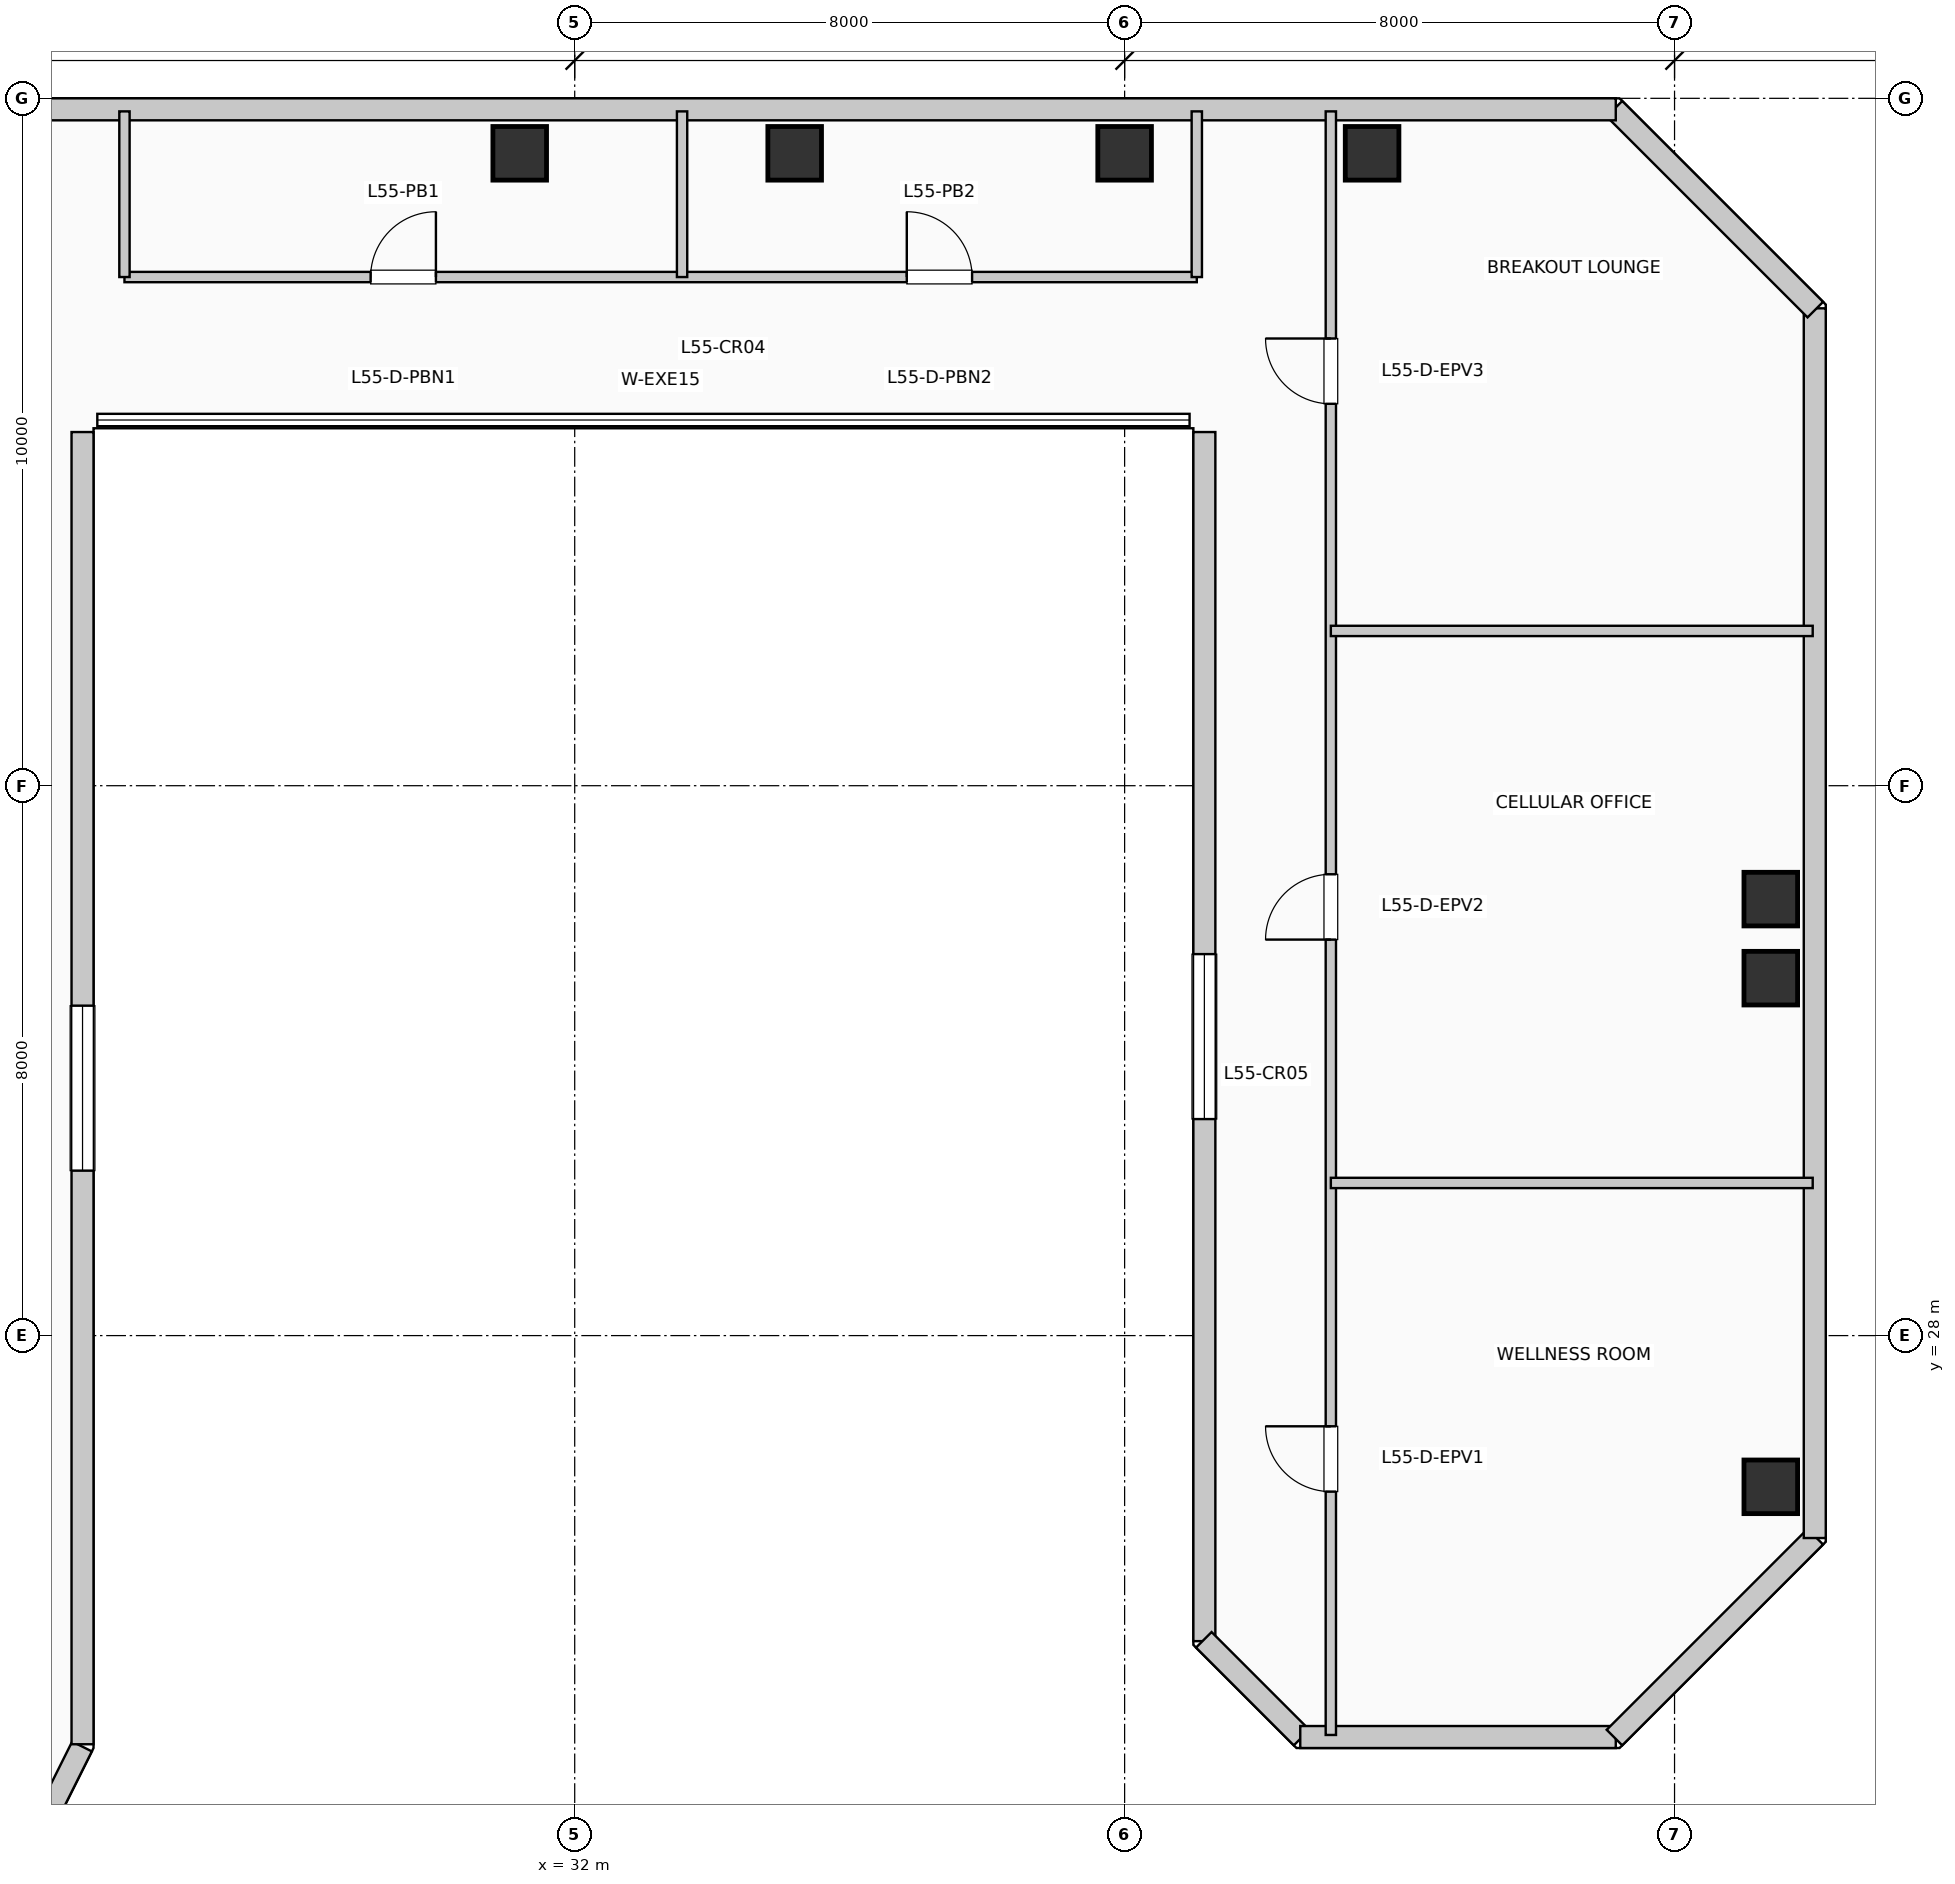
"""IFC4 building model, lengths in metres.
Left out: names, types, materials, properties, quantities, classifications, styles, units other than length and angle.
Written with IfcOpenShell. Run it as: python <this file> out.ifc"""

import sys

from ifc_helpers import new_model, si_unit, direction, frame, frame_2d, origin, origin_2d, place, context, subcontext, project, spatial, rectangle, extrude, element, fill, save


model = new_model("IFC4")
c1 = context("Model", 3, precision=1e-05, world=origin(), true_north=direction((0.0, 1.0)))
c2 = subcontext(c1, "Body", "Model", "MODEL_VIEW")
j1 = project(units=[si_unit("LENGTHUNIT", "METRE"), si_unit("PLANEANGLEUNIT", "RADIAN")], contexts=[c1])
p1 = place(None, origin())
s1 = spatial("IfcSite", under=j1, at=p1, CompositionType="ELEMENT")
p2 = place(p1, origin())
s2 = spatial("IfcBuilding", under=s1, at=p2, CompositionType="ELEMENT")
p3 = place(p2, frame((0.0, 0.0, 227.7)))
s3 = spatial("IfcBuildingStorey", under=s2, at=p3, CompositionType="ELEMENT", Elevation=227.7)
for number, where, z_axis, x_axis in (
    (1, (31.2, 45.2, 0.0), (0.0, 0.0, 1.0), (1.0, 0.0, 0.0)),
    (2, (35.2, 45.2, 0.0), (0.0, 0.0, 1.0), (1.0, 0.0, 0.0)),
    (3, (40.0, 45.2, 0.0), (0.0, 0.0, 1.0), (1.0, 0.0, 0.0)),
    (4, (43.6, 45.2, 0.0), (0.0, 0.0, 1.0), (1.0, 0.0, 0.0)),
    (5, (49.4, 25.8, 0.0), (0.0, 0.0, 1.0), (1.0, 0.0, 0.0)),
    (6, (49.4, 33.2, 0.0), (0.0, 0.0, 1.0), (1.0, 0.0, 0.0)),
    (7, (49.4, 34.35, 0.0), (0.0, 0.0, 1.0), (1.0, 0.0, 0.0)),
):
    element("IfcColumn", number, at=place(p3, frame(where, z_axis=z_axis, x_axis=x_axis)), inside=s3, PredefinedType="COLUMN", context=c2, shape_type="SweptSolid", body=[
        extrude(rectangle(XDim=0.78, YDim=0.78, at=origin_2d()), origin(), (0.0, 0.0, 1.0), 3.96),
    ])
p4 = place(p3, frame((23.882, 20.121, 0.0), z_axis=(0.0, 0.0, 1.0), x_axis=(0.447121734542, 0.894473115583, 0.0)))
e8 = element("IfcWall", 8, at=p4, inside=s3, PredefinedType="SOLIDWALL", context=c2, shape_type="SweptSolid", body=[
    extrude(rectangle(XDim=2.126, YDim=0.32, at=frame_2d((1.063, 0.0))), origin(), (0.0, 0.0, 1.0), 3.71),
])
p5 = place(p3, frame((24.84, 22.055, 0.0), z_axis=(0.0, 0.0, 1.0), x_axis=(0.0, 1.0, 0.0)))
e9 = element("IfcWall", 9, at=p5, inside=s3, PredefinedType="SOLIDWALL", context=c2, shape_type="SweptSolid", body=[
    extrude(rectangle(XDim=19.09, YDim=0.32, at=frame_2d((9.545, 0.0))), origin(), (0.0, 0.0, 1.0), 3.71),
])
p6 = place(p5, frame((8.345, 0.0, 0.85)))
e10 = element("IfcOpeningElement", 10, at=p6, cuts=e9, PredefinedType="OPENING", context=c2, shape_type="SweptSolid", body=[
    extrude(rectangle(XDim=2.4, YDim=2.05, at=frame_2d((1.2, 1.025))), frame((0.0, 0.17, 0.0), z_axis=(0.0, -1.0, 0.0), x_axis=(1.0, 0.0, 0.0)), (0.0, 0.0, 1.0), 0.34),
])
p7 = place(p3, frame((41.16, 41.145, 0.0), z_axis=(0.0, 0.0, 1.0), x_axis=(0.0, -1.0, 0.0)))
e11 = element("IfcWall", 11, at=p7, inside=s3, PredefinedType="SOLIDWALL", context=c2, shape_type="SweptSolid", body=[
    extrude(rectangle(XDim=17.59, YDim=0.32, at=frame_2d((8.795, 0.0))), origin(), (0.0, 0.0, 1.0), 3.71),
])
p8 = place(p7, frame((7.595, 0.0, 0.85)))
e12 = element("IfcOpeningElement", 12, at=p8, cuts=e11, PredefinedType="OPENING", context=c2, shape_type="SweptSolid", body=[
    extrude(rectangle(XDim=2.4, YDim=2.05, at=frame_2d((1.2, 1.025))), frame((0.0, 0.17, 0.0), z_axis=(0.0, -1.0, 0.0), x_axis=(1.0, 0.0, 0.0)), (0.0, 0.0, 1.0), 0.34),
])
p9 = place(p3, frame((41.152, 23.574, 0.0), z_axis=(0.0, 0.0, 1.0), x_axis=(0.707106781187, -0.707106781187, 0.0)))
e13 = element("IfcWall", 13, at=p9, inside=s3, PredefinedType="SOLIDWALL", context=c2, shape_type="SweptSolid", body=[
    extrude(rectangle(XDim=2.011, YDim=0.32, at=frame_2d((1.006, 0.0))), origin(), (0.0, 0.0, 1.0), 3.71),
])
p10 = place(p3, frame((42.555, 22.16, 0.0), z_axis=(0.0, 0.0, 1.0), x_axis=(1.0, 0.0, 0.0)))
e14 = element("IfcWall", 14, at=p10, inside=s3, PredefinedType="SOLIDWALL", context=c2, shape_type="SweptSolid", body=[
    extrude(rectangle(XDim=4.59, YDim=0.32, at=frame_2d((2.295, 0.0))), origin(), (0.0, 0.0, 1.0), 3.71),
])
p11 = place(p3, frame((47.126, 22.152, 0.0), z_axis=(0.0, 0.0, 1.0), x_axis=(0.707136318428, 0.707077242712, 0.0)))
e15 = element("IfcWall", 15, at=p11, inside=s3, PredefinedType="SOLIDWALL", context=c2, shape_type="SweptSolid", body=[
    extrude(rectangle(XDim=4.133, YDim=0.32, at=frame_2d((2.066, 0.0))), origin(), (0.0, 0.0, 1.0), 3.71),
])
p12 = place(p3, frame((50.04, 25.055, 0.0), z_axis=(0.0, 0.0, 1.0), x_axis=(0.0, 1.0, 0.0)))
e16 = element("IfcWall", 16, at=p12, inside=s3, PredefinedType="SOLIDWALL", context=c2, shape_type="SweptSolid", body=[
    extrude(rectangle(XDim=17.89, YDim=0.32, at=frame_2d((8.945, 0.0))), origin(), (0.0, 0.0, 1.0), 3.71),
])
p13 = place(p3, frame((50.048, 42.926, 0.0), z_axis=(0.0, 0.0, 1.0), x_axis=(-0.707136318428, 0.707077242712, 0.0)))
e17 = element("IfcWall", 17, at=p13, inside=s3, PredefinedType="SOLIDWALL", context=c2, shape_type="SweptSolid", body=[
    extrude(rectangle(XDim=4.133, YDim=0.32, at=frame_2d((2.066, 0.0))), origin(), (0.0, 0.0, 1.0), 3.71),
])
p14 = place(p3, frame((47.145, 45.84, 0.0), z_axis=(0.0, 0.0, 1.0), x_axis=(-1.0, 0.0, 0.0)))
e18 = element("IfcWall", 18, at=p14, inside=s3, PredefinedType="SOLIDWALL", context=c2, shape_type="SweptSolid", body=[
    extrude(rectangle(XDim=23.74, YDim=0.32, at=frame_2d((11.87, 0.0))), origin(), (0.0, 0.0, 1.0), 3.71),
])
p15 = place(p3, frame((25.45, 43.4, 0.0), z_axis=(0.0, 0.0, 1.0), x_axis=(1.0, 0.0, 0.0)))
e19 = element("IfcWall", 19, at=p15, inside=s3, PredefinedType="PARTITIONING", context=c2, shape_type="SweptSolid", body=[
    extrude(rectangle(XDim=15.6, YDim=0.15, at=frame_2d((7.8, 0.0))), origin(), (0.0, 0.0, 1.0), 3.71),
])
p16 = place(p15, frame((3.581, 0.0, 0.0)))
e20 = element("IfcOpeningElement", 20, at=p16, cuts=e19, PredefinedType="OPENING", context=c2, shape_type="SweptSolid", body=[
    extrude(rectangle(XDim=0.95, YDim=2.15, at=frame_2d((0.475, 1.075))), frame((0.0, 0.085, 0.0), z_axis=(0.0, -1.0, 0.0), x_axis=(1.0, 0.0, 0.0)), (0.0, 0.0, 1.0), 0.17),
])
p17 = place(p15, frame((11.381, 0.0, 0.0)))
e21 = element("IfcOpeningElement", 21, at=p17, cuts=e19, PredefinedType="OPENING", context=c2, shape_type="SweptSolid", body=[
    extrude(rectangle(XDim=0.95, YDim=2.15, at=frame_2d((0.475, 1.075))), frame((0.0, 0.085, 0.0), z_axis=(0.0, -1.0, 0.0), x_axis=(1.0, 0.0, 0.0)), (0.0, 0.0, 1.0), 0.17),
])
for number, where, z_axis, x_axis in (
    (22, (25.45, 43.4, 0.0), (0.0, 0.0, 1.0), (0.0, 1.0, 0.0)),
    (23, (41.05, 43.4, 0.0), (0.0, 0.0, 1.0), (0.0, 1.0, 0.0)),
    (24, (33.562, 43.4, 0.0), (0.0, 0.0, 1.0), (0.0, 1.0, 0.0)),
):
    element("IfcWall", number, at=place(p3, frame(where, z_axis=z_axis, x_axis=x_axis)), inside=s3, PredefinedType="PARTITIONING", context=c2, shape_type="SweptSolid", body=[
        extrude(rectangle(XDim=2.41, YDim=0.15, at=frame_2d((1.205, 0.0))), origin(), (0.0, 0.0, 1.0), 3.71),
    ])
p18 = place(p3, frame((43.0, 22.19, 0.0), z_axis=(0.0, 0.0, 1.0), x_axis=(0.0, 1.0, 0.0)))
e25 = element("IfcWall", 25, at=p18, inside=s3, PredefinedType="PARTITIONING", context=c2, shape_type="SweptSolid", body=[
    extrude(rectangle(XDim=23.62, YDim=0.15, at=frame_2d((11.81, 0.0))), origin(), (0.0, 0.0, 1.0), 3.71),
])
p19 = place(p18, frame((3.54, 0.0, 0.0)))
e26 = element("IfcOpeningElement", 26, at=p19, cuts=e25, PredefinedType="OPENING", context=c2, shape_type="SweptSolid", body=[
    extrude(rectangle(XDim=0.95, YDim=2.15, at=frame_2d((0.475, 1.075))), frame((0.0, 0.085, 0.0), z_axis=(0.0, -1.0, 0.0), x_axis=(1.0, 0.0, 0.0)), (0.0, 0.0, 1.0), 0.17),
])
p20 = place(p18, frame((11.571, 0.0, 0.0)))
e27 = element("IfcOpeningElement", 27, at=p20, cuts=e25, PredefinedType="OPENING", context=c2, shape_type="SweptSolid", body=[
    extrude(rectangle(XDim=0.95, YDim=2.15, at=frame_2d((0.475, 1.075))), frame((0.0, 0.085, 0.0), z_axis=(0.0, -1.0, 0.0), x_axis=(1.0, 0.0, 0.0)), (0.0, 0.0, 1.0), 0.17),
])
p21 = place(p18, frame((19.366, 0.0, 0.0)))
e28 = element("IfcOpeningElement", 28, at=p21, cuts=e25, PredefinedType="OPENING", context=c2, shape_type="SweptSolid", body=[
    extrude(rectangle(XDim=0.95, YDim=2.15, at=frame_2d((0.475, 1.075))), frame((0.0, 0.085, 0.0), z_axis=(0.0, -1.0, 0.0), x_axis=(1.0, 0.0, 0.0)), (0.0, 0.0, 1.0), 0.17),
])
for number, where, z_axis, x_axis in (
    (29, (43.0, 30.221, 0.0), (0.0, 0.0, 1.0), (1.0, 0.0, 0.0)),
    (30, (43.0, 38.252, 0.0), (0.0, 0.0, 1.0), (1.0, 0.0, 0.0)),
):
    element("IfcWall", number, at=place(p3, frame(where, z_axis=z_axis, x_axis=x_axis)), inside=s3, PredefinedType="PARTITIONING", context=c2, shape_type="SweptSolid", body=[
        extrude(rectangle(XDim=7.01, YDim=0.15, at=frame_2d((3.505, 0.0))), origin(), (0.0, 0.0, 1.0), 3.71),
    ])
p22 = place(p6, origin())
e31 = element("IfcWindow", 31, at=p22, inside=s3, PartitioningType="SINGLE_PANEL", PredefinedType="WINDOW", context=c2, shape_type="SweptSolid", body=[
    extrude(rectangle(XDim=2.4, YDim=2.05, at=frame_2d((1.2, 1.025))), frame((0.0, 0.03, 0.0), z_axis=(0.0, -1.0, 0.0), x_axis=(1.0, 0.0, 0.0)), (0.0, 0.0, 1.0), 0.06),
])
fill(e10, e31)
p23 = place(p8, origin())
e32 = element("IfcWindow", 32, at=p23, inside=s3, PartitioningType="SINGLE_PANEL", PredefinedType="WINDOW", context=c2, shape_type="SweptSolid", body=[
    extrude(rectangle(XDim=2.4, YDim=2.05, at=frame_2d((1.2, 1.025))), frame((0.0, 0.03, 0.0), z_axis=(0.0, -1.0, 0.0), x_axis=(1.0, 0.0, 0.0)), (0.0, 0.0, 1.0), 0.06),
])
fill(e12, e32)
p24 = place(p16, origin())
e33 = element("IfcDoor", 33, at=p24, inside=s3, OperationType="SINGLE_SWING_RIGHT", PredefinedType="DOOR", context=c2, shape_type="SweptSolid", body=[
    extrude(rectangle(XDim=0.95, YDim=2.15, at=frame_2d((0.475, 1.075))), frame((0.0, 0.025, 0.0), z_axis=(0.0, -1.0, 0.0), x_axis=(1.0, 0.0, 0.0)), (0.0, 0.0, 1.0), 0.05),
])
fill(e20, e33)
p25 = place(p17, origin())
e34 = element("IfcDoor", 34, at=p25, inside=s3, OperationType="SINGLE_SWING_LEFT", PredefinedType="DOOR", context=c2, shape_type="SweptSolid", body=[
    extrude(rectangle(XDim=0.95, YDim=2.15, at=frame_2d((0.475, 1.075))), frame((0.0, 0.025, 0.0), z_axis=(0.0, -1.0, 0.0), x_axis=(1.0, 0.0, 0.0)), (0.0, 0.0, 1.0), 0.05),
])
fill(e21, e34)
p26 = place(p19, origin())
e35 = element("IfcDoor", 35, at=p26, inside=s3, OperationType="SINGLE_SWING_RIGHT", PredefinedType="DOOR", context=c2, shape_type="SweptSolid", body=[
    extrude(rectangle(XDim=0.95, YDim=2.15, at=frame_2d((0.475, 1.075))), frame((0.0, 0.025, 0.0), z_axis=(0.0, -1.0, 0.0), x_axis=(1.0, 0.0, 0.0)), (0.0, 0.0, 1.0), 0.05),
])
fill(e26, e35)
p27 = place(p20, origin())
e36 = element("IfcDoor", 36, at=p27, inside=s3, OperationType="SINGLE_SWING_LEFT", PredefinedType="DOOR", context=c2, shape_type="SweptSolid", body=[
    extrude(rectangle(XDim=0.95, YDim=2.15, at=frame_2d((0.475, 1.075))), frame((0.0, 0.025, 0.0), z_axis=(0.0, -1.0, 0.0), x_axis=(1.0, 0.0, 0.0)), (0.0, 0.0, 1.0), 0.05),
])
fill(e27, e36)
p28 = place(p21, origin())
e37 = element("IfcDoor", 37, at=p28, inside=s3, OperationType="SINGLE_SWING_RIGHT", PredefinedType="DOOR", context=c2, shape_type="SweptSolid", body=[
    extrude(rectangle(XDim=0.95, YDim=2.15, at=frame_2d((0.475, 1.075))), frame((0.0, 0.025, 0.0), z_axis=(0.0, -1.0, 0.0), x_axis=(1.0, 0.0, 0.0)), (0.0, 0.0, 1.0), 0.05),
])
fill(e28, e37)
save(model, sys.argv[1])
